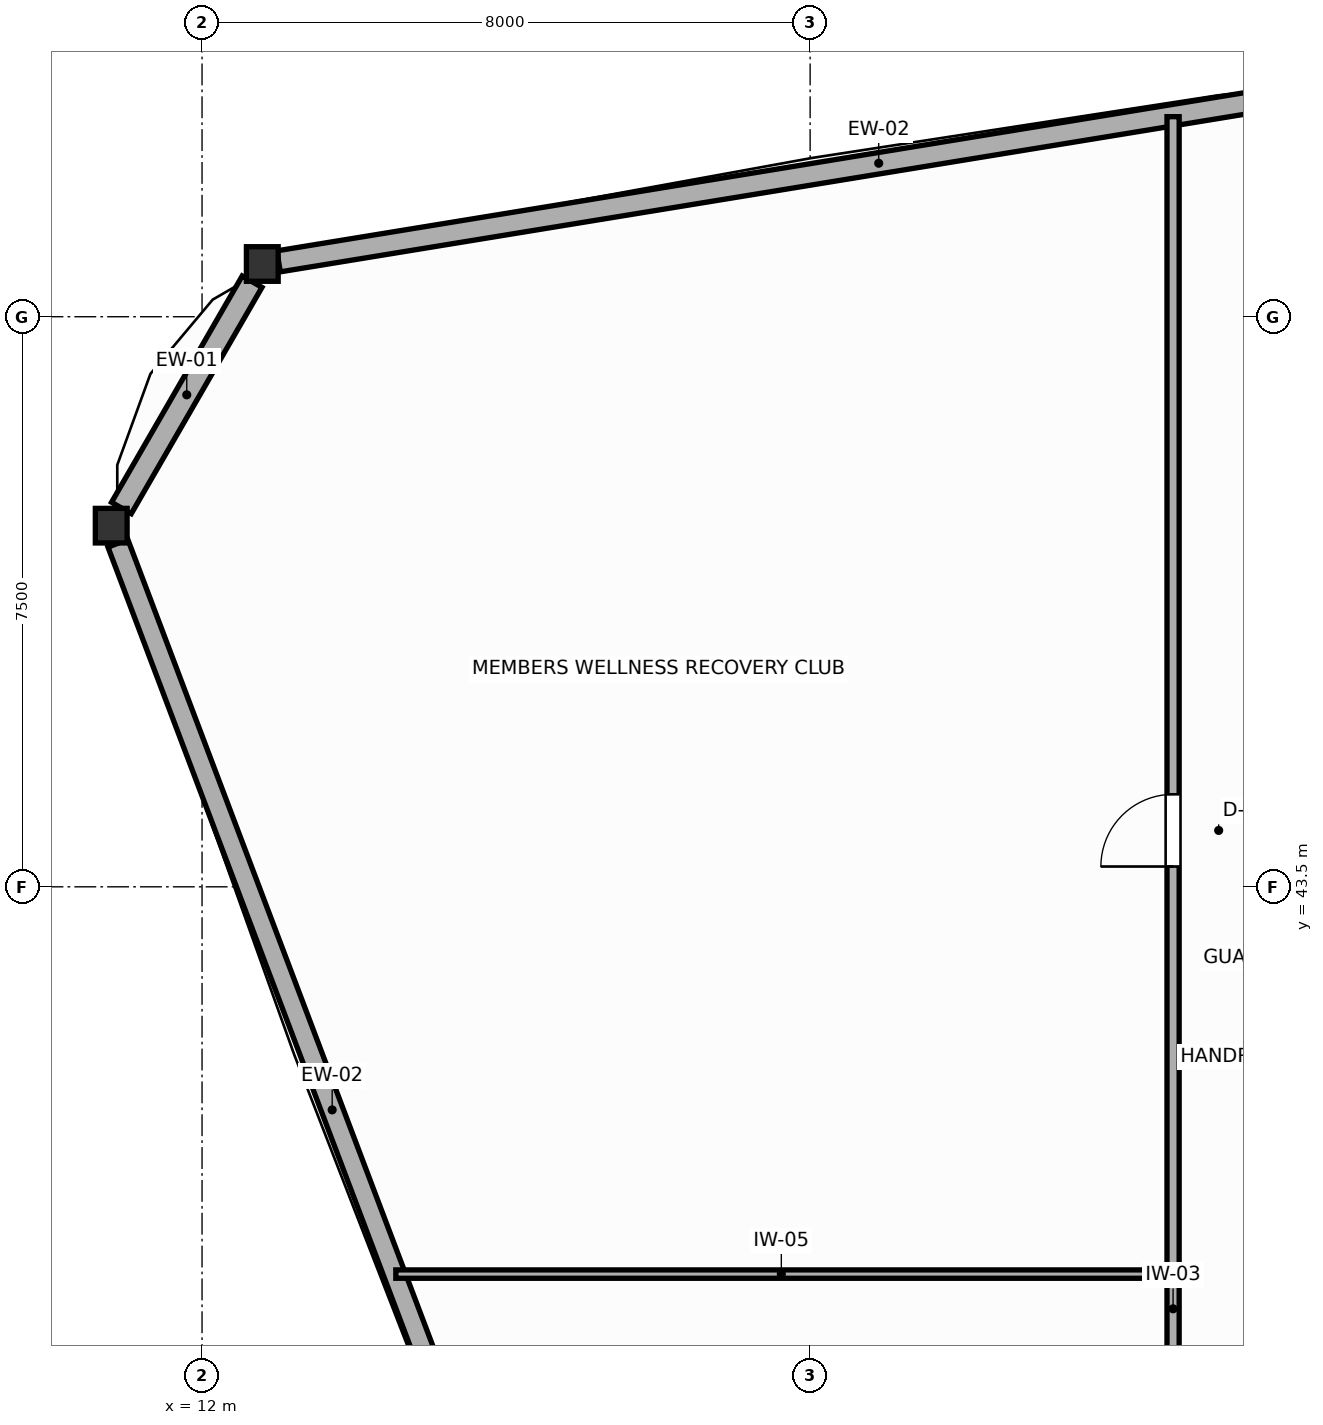
"""IFC4 building model, lengths in metres.
Left out: names, types, materials, properties, quantities, classifications, styles, units other than length and angle.
Written with IfcOpenShell. Run it as: python <this file> out.ifc"""

import sys

from ifc_helpers import new_model, si_unit, direction, frame, frame_2d, origin, origin_2d, place, context, subcontext, project, spatial, rectangle, i_section, extrude, source, transform, mapped, element, fill, save


model = new_model("IFC4")
c1 = context("Model", 3, precision=1e-05, world=origin(), true_north=direction((0.0, 1.0)))
c2 = subcontext(c1, "Body", "Model", "MODEL_VIEW")
j1 = project(units=[si_unit("LENGTHUNIT", "METRE"), si_unit("PLANEANGLEUNIT", "RADIAN")], contexts=[c1])
p1 = place(None, origin())
s1 = spatial("IfcSite", under=j1, at=p1, CompositionType="ELEMENT")
p2 = place(p1, origin())
s2 = spatial("IfcBuilding", under=s1, at=p2, CompositionType="ELEMENT")
p3 = place(p2, frame((0.0, 0.0, 109.8)))
s3 = spatial("IfcBuildingStorey", under=s2, at=p3, CompositionType="ELEMENT", Elevation=109.8)
m1 = source(origin(), c2, "Body", "SweptSolid", [
    extrude(i_section(OverallWidth=0.418, OverallDepth=0.455, WebThickness=0.039, FlangeThickness=0.063, FilletRadius=0.015, at=origin_2d()), origin(), (0.0, 0.0, 1.0), 3.6),
])
for number, where, z_axis, x_axis in (
    (1, (12.792, 51.694, 0.0), (0.0, 0.0, 1.0), (1.0, 0.0, 0.0)),
    (2, (10.805, 48.251, 0.0), (0.0, 0.0, 1.0), (1.0, 0.0, 0.0)),
):
    element("IfcColumn", number, at=place(p3, frame(where, z_axis=z_axis, x_axis=x_axis)), inside=s3, PredefinedType="COLUMN", context=c2, shape_type="MappedRepresentation", body=[
        mapped(m1, transform((0.0, 0.0, 0.0), scale=1.0)),
    ])
p4 = place(p3, frame((28.798, 54.31, 0.0), z_axis=(0.0, 0.0, 1.0), x_axis=(-0.98690696995, -0.161290522546, 0.0)))
e3 = element("IfcWall", 3, at=p4, inside=s3, PredefinedType="SOLIDWALL", context=c2, shape_type="SweptSolid", body=[
    extrude(rectangle(XDim=16.001, YDim=0.28, at=frame_2d((8.0, 0.0))), origin(), (0.0, 0.0, 1.0), 1.87),
])
p5 = place(p3, frame((12.658, 51.461, 0.0), z_axis=(0.0, 0.0, 1.0), x_axis=(-0.500064626416, -0.86598808849, 0.0)))
e4 = element("IfcWall", 4, at=p5, inside=s3, PredefinedType="SOLIDWALL", context=c2, shape_type="SweptSolid", body=[
    extrude(rectangle(XDim=3.438, YDim=0.3, at=frame_2d((1.719, 0.0))), origin(), (0.0, 0.0, 1.0), 1.87),
])
p6 = place(p3, frame((10.893, 48.019, 0.0), z_axis=(0.0, 0.0, 1.0), x_axis=(0.353771130195, -0.935332019895, 0.0)))
e5 = element("IfcWall", 5, at=p6, inside=s3, PredefinedType="SOLIDWALL", context=c2, shape_type="SweptSolid", body=[
    extrude(rectangle(XDim=15.937, YDim=0.28, at=frame_2d((7.969, 0.0))), origin(), (0.0, 0.0, 1.0), 1.87),
])
p7 = place(p3, frame((24.775, 32.31, 0.0), z_axis=(0.0, 0.0, 1.0), x_axis=(0.0, 1.0, 0.0)))
e6 = element("IfcWall", 6, at=p7, inside=s3, PredefinedType="PARTITIONING", context=c2, shape_type="SweptSolid", body=[
    extrude(rectangle(XDim=21.322, YDim=0.16, at=frame_2d((10.661, 0.0))), origin(), (0.0, 0.0, 1.0), 3.4),
])
p8 = place(p7, frame((11.457, 0.0, 0.0)))
e7 = element("IfcOpeningElement", 7, at=p8, cuts=e6, PredefinedType="OPENING", context=c2, shape_type="SweptSolid", body=[
    extrude(rectangle(XDim=0.95, YDim=2.05, at=frame_2d((0.475, 1.025))), frame((0.0, 0.09, 0.0), z_axis=(0.0, -1.0, 0.0), x_axis=(1.0, 0.0, 0.0)), (0.0, 0.0, 1.0), 0.18),
])
p9 = place(p3, frame((14.549, 38.405, 0.0), z_axis=(0.0, 0.0, 1.0), x_axis=(1.0, 0.0, 0.0)))
e8 = element("IfcWall", 8, at=p9, inside=s3, PredefinedType="MOVABLE", context=c2, shape_type="SweptSolid", body=[
    extrude(rectangle(XDim=10.144, YDim=0.11, at=frame_2d((5.072, 0.0))), origin(), (0.0, 0.0, 1.0), 3.4),
])
p10 = place(p8, origin())
e9 = element("IfcDoor", 9, at=p10, inside=s3, OperationType="SINGLE_SWING_LEFT", PredefinedType="DOOR", context=c2, shape_type="SweptSolid", body=[
    extrude(rectangle(XDim=0.95, YDim=2.05, at=frame_2d((0.475, 1.025))), frame((0.0, 0.025, 0.0), z_axis=(0.0, -1.0, 0.0), x_axis=(1.0, 0.0, 0.0)), (0.0, 0.0, 1.0), 0.05),
])
fill(e7, e9)
save(model, sys.argv[1])
